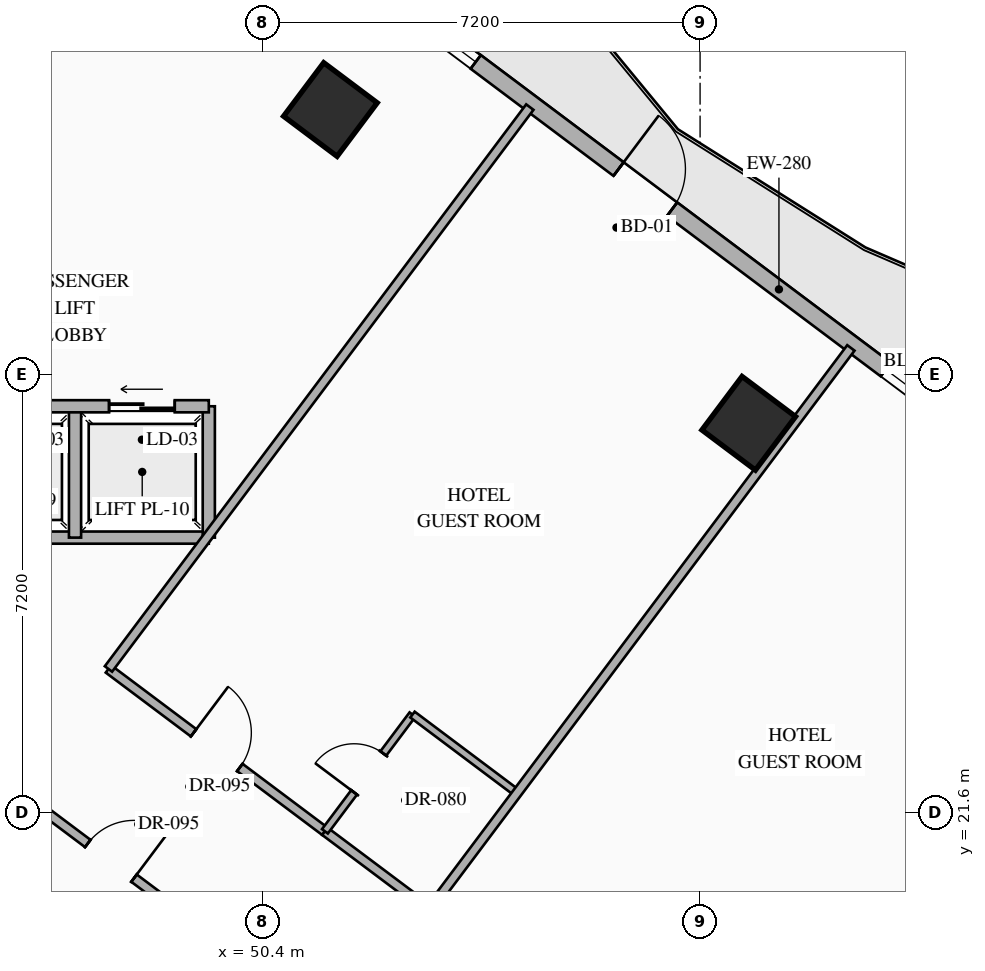
"""IFC4 building model, lengths in metres.
Left out: names, types, materials, properties, quantities, classifications, styles, units other than length and angle.
Written with IfcOpenShell. Run it as: python <this file> out.ifc"""

import sys

from ifc_helpers import new_model, si_unit, direction, frame, frame_2d, origin, origin_2d, place, context, subcontext, project, spatial, rectangle, hollow_rectangle, extrude, element, fill, save


model = new_model("IFC4")
c1 = context("Model", 3, precision=1e-05, world=origin(), true_north=direction((0.0, 1.0)))
c2 = subcontext(c1, "Body", "Model", "MODEL_VIEW")
j1 = project(units=[si_unit("LENGTHUNIT", "METRE"), si_unit("PLANEANGLEUNIT", "RADIAN")], contexts=[c1])
p1 = place(None, origin())
s1 = spatial("IfcSite", under=j1, at=p1, CompositionType="ELEMENT")
p2 = place(p1, origin())
s2 = spatial("IfcBuilding", under=s1, at=p2, CompositionType="ELEMENT")
p3 = place(p2, frame((0.0, 0.0, 39.95)))
s3 = spatial("IfcBuildingStorey", under=s2, at=p3, CompositionType="ELEMENT", Elevation=39.95)
for number, where, z_axis, x_axis in (
    (1, (51.52, 33.16, 0.0), (0.0, 0.0, 1.0), (0.8, -0.6, 0.0)),
    (2, (58.4, 28.0, 0.0), (0.0, 0.0, 1.0), (0.8, -0.6, 0.0)),
):
    element("IfcColumn", number, at=place(p3, frame(where, z_axis=z_axis, x_axis=x_axis)), inside=s3, PredefinedType="COLUMN", context=c2, shape_type="SweptSolid", body=[
        extrude(hollow_rectangle(XDim=1.1, YDim=1.1, WallThickness=0.04, at=origin_2d()), origin(), (0.0, 0.0, 1.0), 3.35),
    ])
p4 = place(p3, frame((44.86, 40.73, 0.0), z_axis=(0.0, 0.0, 1.0), x_axis=(0.800006902154, -0.599990797017, 0.0)))
e3 = element("IfcWall", 3, at=p4, inside=s3, PredefinedType="STANDARD", context=c2, shape_type="SweptSolid", body=[
    extrude(rectangle(XDim=29.712, YDim=0.28, at=frame_2d((14.856, 0.0))), origin(), (0.0, 0.0, 1.0), 3.13),
])
p5 = place(p4, frame((14.249, 0.0, 0.0)))
e4 = element("IfcOpeningElement", 4, at=p5, cuts=e3, PredefinedType="OPENING", context=c2, shape_type="SweptSolid", body=[
    extrude(rectangle(XDim=1.1, YDim=2.2, at=frame_2d((0.55, 1.1))), frame((0.0, 0.15, 0.0), z_axis=(0.0, -1.0, 0.0), x_axis=(1.0, 0.0, 0.0)), (0.0, 0.0, 1.0), 0.3),
])
p6 = place(p4, frame((1.612, 0.0, 0.85)))
e5 = element("IfcOpeningElement", 5, at=p6, cuts=e3, PredefinedType="OPENING", context=c2, shape_type="SweptSolid", body=[
    extrude(rectangle(XDim=1.4, YDim=1.8, at=frame_2d((0.7, 0.9))), frame((0.0, 0.15, 0.0), z_axis=(0.0, -1.0, 0.0), x_axis=(1.0, 0.0, 0.0)), (0.0, 0.0, 1.0), 0.3),
])
p7 = place(p4, frame((5.667, 0.0, 0.85)))
e6 = element("IfcOpeningElement", 6, at=p7, cuts=e3, PredefinedType="OPENING", context=c2, shape_type="SweptSolid", body=[
    extrude(rectangle(XDim=1.4, YDim=1.8, at=frame_2d((0.7, 0.9))), frame((0.0, 0.15, 0.0), z_axis=(0.0, -1.0, 0.0), x_axis=(1.0, 0.0, 0.0)), (0.0, 0.0, 1.0), 0.3),
])
p8 = place(p4, frame((9.912, 0.0, 0.85)))
e7 = element("IfcOpeningElement", 7, at=p8, cuts=e3, PredefinedType="OPENING", context=c2, shape_type="SweptSolid", body=[
    extrude(rectangle(XDim=1.4, YDim=1.8, at=frame_2d((0.7, 0.9))), frame((0.0, 0.15, 0.0), z_axis=(0.0, -1.0, 0.0), x_axis=(1.0, 0.0, 0.0)), (0.0, 0.0, 1.0), 0.3),
])
p9 = place(p4, frame((19.743, 0.0, 0.85)))
e8 = element("IfcOpeningElement", 8, at=p9, cuts=e3, PredefinedType="OPENING", context=c2, shape_type="SweptSolid", body=[
    extrude(rectangle(XDim=1.4, YDim=1.8, at=frame_2d((0.7, 0.9))), frame((0.0, 0.15, 0.0), z_axis=(0.0, -1.0, 0.0), x_axis=(1.0, 0.0, 0.0)), (0.0, 0.0, 1.0), 0.3),
])
p10 = place(p4, frame((22.645, 0.0, 0.85)))
e9 = element("IfcOpeningElement", 9, at=p10, cuts=e3, PredefinedType="OPENING", context=c2, shape_type="SweptSolid", body=[
    extrude(rectangle(XDim=1.4, YDim=1.8, at=frame_2d((0.7, 0.9))), frame((0.0, 0.15, 0.0), z_axis=(0.0, -1.0, 0.0), x_axis=(1.0, 0.0, 0.0)), (0.0, 0.0, 1.0), 0.3),
])
p11 = place(p4, frame((26.7, 0.0, 0.85)))
e10 = element("IfcOpeningElement", 10, at=p11, cuts=e3, PredefinedType="OPENING", context=c2, shape_type="SweptSolid", body=[
    extrude(rectangle(XDim=1.4, YDim=1.8, at=frame_2d((0.7, 0.9))), frame((0.0, 0.15, 0.0), z_axis=(0.0, -1.0, 0.0), x_axis=(1.0, 0.0, 0.0)), (0.0, 0.0, 1.0), 0.3),
])
p12 = place(p3, frame((53.318, 2.487, 0.0), z_axis=(0.0, 0.0, 1.0), x_axis=(-0.800004174678, 0.599994433723, 0.0)))
e11 = element("IfcWall", 11, at=p12, inside=s3, PredefinedType="STANDARD", context=c2, shape_type="SweptSolid", body=[
    extrude(rectangle(XDim=35.089, YDim=0.28, at=frame_2d((17.544, 0.0))), origin(), (0.0, 0.0, 1.0), 3.13),
])
p13 = place(p12, frame((1.931, 0.0, 0.85)))
e12 = element("IfcOpeningElement", 12, at=p13, cuts=e11, PredefinedType="OPENING", context=c2, shape_type="SweptSolid", body=[
    extrude(rectangle(XDim=1.4, YDim=1.8, at=frame_2d((0.7, 0.9))), frame((0.0, 0.15, 0.0), z_axis=(0.0, -1.0, 0.0), x_axis=(1.0, 0.0, 0.0)), (0.0, 0.0, 1.0), 0.3),
])
p14 = place(p12, frame((6.819, 0.0, 0.85)))
e13 = element("IfcOpeningElement", 13, at=p14, cuts=e11, PredefinedType="OPENING", context=c2, shape_type="SweptSolid", body=[
    extrude(rectangle(XDim=1.4, YDim=1.8, at=frame_2d((0.7, 0.9))), frame((0.0, 0.15, 0.0), z_axis=(0.0, -1.0, 0.0), x_axis=(1.0, 0.0, 0.0)), (0.0, 0.0, 1.0), 0.3),
])
p15 = place(p12, frame((11.832, 0.0, 0.85)))
e14 = element("IfcOpeningElement", 14, at=p15, cuts=e11, PredefinedType="OPENING", context=c2, shape_type="SweptSolid", body=[
    extrude(rectangle(XDim=1.4, YDim=1.8, at=frame_2d((0.7, 0.9))), frame((0.0, 0.15, 0.0), z_axis=(0.0, -1.0, 0.0), x_axis=(1.0, 0.0, 0.0)), (0.0, 0.0, 1.0), 0.3),
])
p16 = place(p12, frame((17.647, 0.0, 0.85)))
e15 = element("IfcOpeningElement", 15, at=p16, cuts=e11, PredefinedType="OPENING", context=c2, shape_type="SweptSolid", body=[
    extrude(rectangle(XDim=1.4, YDim=1.8, at=frame_2d((0.7, 0.9))), frame((0.0, 0.15, 0.0), z_axis=(0.0, -1.0, 0.0), x_axis=(1.0, 0.0, 0.0)), (0.0, 0.0, 1.0), 0.3),
])
p17 = place(p12, frame((21.857, 0.0, 0.85)))
e16 = element("IfcOpeningElement", 16, at=p17, cuts=e11, PredefinedType="OPENING", context=c2, shape_type="SweptSolid", body=[
    extrude(rectangle(XDim=1.4, YDim=1.8, at=frame_2d((0.7, 0.9))), frame((0.0, 0.15, 0.0), z_axis=(0.0, -1.0, 0.0), x_axis=(1.0, 0.0, 0.0)), (0.0, 0.0, 1.0), 0.3),
])
p18 = place(p12, frame((26.87, 0.0, 0.85)))
e17 = element("IfcOpeningElement", 17, at=p18, cuts=e11, PredefinedType="OPENING", context=c2, shape_type="SweptSolid", body=[
    extrude(rectangle(XDim=1.4, YDim=1.8, at=frame_2d((0.7, 0.9))), frame((0.0, 0.15, 0.0), z_axis=(0.0, -1.0, 0.0), x_axis=(1.0, 0.0, 0.0)), (0.0, 0.0, 1.0), 0.3),
])
p19 = place(p12, frame((31.757, 0.0, 0.85)))
e18 = element("IfcOpeningElement", 18, at=p19, cuts=e11, PredefinedType="OPENING", context=c2, shape_type="SweptSolid", body=[
    extrude(rectangle(XDim=1.4, YDim=1.8, at=frame_2d((0.7, 0.9))), frame((0.0, 0.15, 0.0), z_axis=(0.0, -1.0, 0.0), x_axis=(1.0, 0.0, 0.0)), (0.0, 0.0, 1.0), 0.3),
])
p20 = place(p3, frame((45.12, 26.12, 0.0), z_axis=(0.0, 0.0, 1.0), x_axis=(1.0, 0.0, 0.0)))
e19 = element("IfcWall", 19, at=p20, inside=s3, PredefinedType="STANDARD", context=c2, shape_type="SweptSolid", body=[
    extrude(rectangle(XDim=4.4, YDim=0.2, at=frame_2d((2.2, 0.0))), origin(), (0.0, 0.0, 1.0), 3.13),
])
for number, where, z_axis, x_axis in (
    (20, (49.52, 26.12, 0.0), (0.0, 0.0, 1.0), (0.0, 1.0, 0.0)),
    (21, (47.32, 26.12, 0.0), (0.0, 0.0, 1.0), (0.0, 1.0, 0.0)),
):
    element("IfcWall", number, at=place(p3, frame(where, z_axis=z_axis, x_axis=x_axis)), inside=s3, PredefinedType="STANDARD", context=c2, shape_type="SweptSolid", body=[
        extrude(rectangle(XDim=2.16, YDim=0.2, at=frame_2d((1.08, 0.0))), origin(), (0.0, 0.0, 1.0), 3.13),
    ])
p21 = place(p3, frame((45.12, 28.28, 0.0), z_axis=(0.0, 0.0, 1.0), x_axis=(1.0, 0.0, 0.0)))
e22 = element("IfcWall", 22, at=p21, inside=s3, PredefinedType="STANDARD", context=c2, shape_type="SweptSolid", body=[
    extrude(rectangle(XDim=4.4, YDim=0.2, at=frame_2d((2.2, 0.0))), origin(), (0.0, 0.0, 1.0), 3.13),
])
p22 = place(p21, frame((0.56, 0.0, 0.0)))
e23 = element("IfcOpeningElement", 23, at=p22, cuts=e22, PredefinedType="OPENING", context=c2, shape_type="SweptSolid", body=[
    extrude(rectangle(XDim=1.08, YDim=2.15, at=frame_2d((0.54, 1.075))), frame((0.0, 0.11, 0.0), z_axis=(0.0, -1.0, 0.0), x_axis=(1.0, 0.0, 0.0)), (0.0, 0.0, 1.0), 0.22),
])
p23 = place(p21, frame((2.76, 0.0, 0.0)))
e24 = element("IfcOpeningElement", 24, at=p23, cuts=e22, PredefinedType="OPENING", context=c2, shape_type="SweptSolid", body=[
    extrude(rectangle(XDim=1.08, YDim=2.15, at=frame_2d((0.54, 1.075))), frame((0.0, 0.11, 0.0), z_axis=(0.0, -1.0, 0.0), x_axis=(1.0, 0.0, 0.0)), (0.0, 0.0, 1.0), 0.22),
])
p24 = place(p3, frame((47.87, 23.96, 0.0), z_axis=(0.0, 0.0, 1.0), x_axis=(0.799993416095, -0.600008778439, 0.0)))
e25 = element("IfcWall", 25, at=p24, inside=s3, PredefinedType="PARTITIONING", context=c2, shape_type="SweptSolid", body=[
    extrude(rectangle(XDim=4.45, YDim=0.15, at=frame_2d((2.225, 0.0))), origin(), (0.0, 0.0, 1.0), 2.775),
])
p25 = place(p24, frame((1.75, 0.0, 0.0)))
e26 = element("IfcOpeningElement", 26, at=p25, cuts=e25, PredefinedType="OPENING", context=c2, shape_type="SweptSolid", body=[
    extrude(rectangle(XDim=0.95, YDim=2.15, at=frame_2d((0.475, 1.075))), frame((0.0, 0.085, 0.0), z_axis=(0.0, -1.0, 0.0), x_axis=(1.0, 0.0, 0.0)), (0.0, 0.0, 1.0), 0.17),
])
p26 = place(p3, frame((51.43, 21.29, 0.0), z_axis=(0.0, 0.0, 1.0), x_axis=(0.79998637334, -0.60001816845, 0.0)))
e27 = element("IfcWall", 27, at=p26, inside=s3, PredefinedType="PARTITIONING", context=c2, shape_type="SweptSolid", body=[
    extrude(rectangle(XDim=2.15, YDim=0.15, at=frame_2d((1.075, 0.0))), origin(), (0.0, 0.0, 1.0), 2.775),
])
p27 = place(p3, frame((51.43, 21.29, 0.0), z_axis=(0.0, 0.0, 1.0), x_axis=(0.600065100855, 0.79995117022, 0.0)))
e28 = element("IfcWall", 28, at=p27, inside=s3, PredefinedType="PARTITIONING", context=c2, shape_type="SweptSolid", body=[
    extrude(rectangle(XDim=2.4, YDim=0.12, at=frame_2d((1.2, 0.0))), origin(), (0.0, 0.0, 1.0), 3.13),
])
p28 = place(p27, frame((0.8, 0.0, 0.0)))
e29 = element("IfcOpeningElement", 29, at=p28, cuts=e28, PredefinedType="OPENING", context=c2, shape_type="SweptSolid", body=[
    extrude(rectangle(XDim=0.8, YDim=2.06, at=frame_2d((0.4, 1.03))), frame((0.0, 0.07, 0.0), z_axis=(0.0, -1.0, 0.0), x_axis=(1.0, 0.0, 0.0)), (0.0, 0.0, 1.0), 0.14),
])
p29 = place(p3, frame((52.87, 23.21, 0.0), z_axis=(0.0, 0.0, 1.0), x_axis=(0.79998637334, -0.60001816845, 0.0)))
e30 = element("IfcWall", 30, at=p29, inside=s3, PredefinedType="PARTITIONING", context=c2, shape_type="SweptSolid", body=[
    extrude(rectangle(XDim=2.15, YDim=0.12, at=frame_2d((1.075, 0.0))), origin(), (0.0, 0.0, 1.0), 3.13),
])
for number, where, z_axis, x_axis in (
    (31, (47.87, 23.96, 0.0), (0.0, 0.0, 1.0), (0.6, 0.8, 0.0)),
    (32, (53.15, 20.0, 0.0), (0.0, 0.0, 1.0), (0.6, 0.8, 0.0)),
    (33, (58.43, 16.04, 0.0), (0.0, 0.0, 1.0), (0.6, 0.8, 0.0)),
):
    element("IfcWall", number, at=place(p3, frame(where, z_axis=z_axis, x_axis=x_axis)), inside=s3, PredefinedType="PARTITIONING", context=c2, shape_type="SweptSolid", body=[
        extrude(rectangle(XDim=11.55, YDim=0.15, at=frame_2d((5.775, 0.0))), origin(), (0.0, 0.0, 1.0), 3.13),
    ])
p30 = place(p3, frame((46.37, 21.96, 0.0), z_axis=(0.0, 0.0, 1.0), x_axis=(0.799977170108, -0.600030438649, 0.0)))
e34 = element("IfcWall", 34, at=p30, inside=s3, PredefinedType="PARTITIONING", context=c2, shape_type="SweptSolid", body=[
    extrude(rectangle(XDim=3.85, YDim=0.15, at=frame_2d((1.925, 0.0))), origin(), (0.0, 0.0, 1.0), 2.425),
])
p31 = place(p30, frame((1.45, 0.0, 0.0)))
e35 = element("IfcOpeningElement", 35, at=p31, cuts=e34, PredefinedType="OPENING", context=c2, shape_type="SweptSolid", body=[
    extrude(rectangle(XDim=0.95, YDim=2.15, at=frame_2d((0.475, 1.075))), frame((0.0, 0.085, 0.0), z_axis=(0.0, -1.0, 0.0), x_axis=(1.0, 0.0, 0.0)), (0.0, 0.0, 1.0), 0.17),
])
p32 = place(p5, origin())
e36 = element("IfcDoor", 36, at=p32, inside=s3, OperationType="SINGLE_SWING_LEFT", PredefinedType="DOOR", context=c2, shape_type="SweptSolid", body=[
    extrude(rectangle(XDim=1.1, YDim=2.2, at=frame_2d((0.55, 1.1))), frame((0.0, 0.025, 0.0), z_axis=(0.0, -1.0, 0.0), x_axis=(1.0, 0.0, 0.0)), (0.0, 0.0, 1.0), 0.05),
])
fill(e4, e36)
p33 = place(p8, origin())
e37 = element("IfcWindow", 37, at=p33, inside=s3, PartitioningType="SINGLE_PANEL", PredefinedType="WINDOW", context=c2, shape_type="SweptSolid", body=[
    extrude(rectangle(XDim=1.4, YDim=1.8, at=frame_2d((0.7, 0.9))), frame((0.0, 0.03, 0.0), z_axis=(0.0, -1.0, 0.0), x_axis=(1.0, 0.0, 0.0)), (0.0, 0.0, 1.0), 0.06),
])
fill(e7, e37)
p34 = place(p9, origin())
e38 = element("IfcWindow", 38, at=p34, inside=s3, PartitioningType="SINGLE_PANEL", PredefinedType="WINDOW", context=c2, shape_type="SweptSolid", body=[
    extrude(rectangle(XDim=1.4, YDim=1.8, at=frame_2d((0.7, 0.9))), frame((0.0, 0.03, 0.0), z_axis=(0.0, -1.0, 0.0), x_axis=(1.0, 0.0, 0.0)), (0.0, 0.0, 1.0), 0.06),
])
fill(e8, e38)
p35 = place(p23, origin())
e39 = element("IfcDoor", 39, at=p35, inside=s3, OperationType="SLIDING_TO_LEFT", PredefinedType="USERDEFINED", context=c2, shape_type="SweptSolid", body=[
    extrude(rectangle(XDim=1.08, YDim=2.15, at=frame_2d((0.54, 1.075))), frame((0.0, 0.025, 0.0), z_axis=(0.0, -1.0, 0.0), x_axis=(1.0, 0.0, 0.0)), (0.0, 0.0, 1.0), 0.05),
])
fill(e24, e39)
p36 = place(p25, origin())
e40 = element("IfcDoor", 40, at=p36, inside=s3, OperationType="SINGLE_SWING_LEFT", PredefinedType="DOOR", context=c2, shape_type="SweptSolid", body=[
    extrude(rectangle(XDim=0.95, YDim=2.15, at=frame_2d((0.475, 1.075))), frame((0.0, 0.025, 0.0), z_axis=(0.0, -1.0, 0.0), x_axis=(1.0, 0.0, 0.0)), (0.0, 0.0, 1.0), 0.05),
])
fill(e26, e40)
p37 = place(p28, origin())
e41 = element("IfcDoor", 41, at=p37, inside=s3, OperationType="SINGLE_SWING_LEFT", PredefinedType="DOOR", context=c2, shape_type="SweptSolid", body=[
    extrude(rectangle(XDim=0.8, YDim=2.06, at=frame_2d((0.4, 1.03))), frame((0.0, 0.025, 0.0), z_axis=(0.0, -1.0, 0.0), x_axis=(1.0, 0.0, 0.0)), (0.0, 0.0, 1.0), 0.05),
])
fill(e29, e41)
p38 = place(p31, origin())
e42 = element("IfcDoor", 42, at=p38, inside=s3, OperationType="SINGLE_SWING_RIGHT", PredefinedType="DOOR", context=c2, shape_type="SweptSolid", body=[
    extrude(rectangle(XDim=0.95, YDim=2.15, at=frame_2d((0.475, 1.075))), frame((0.0, 0.025, 0.0), z_axis=(0.0, -1.0, 0.0), x_axis=(1.0, 0.0, 0.0)), (0.0, 0.0, 1.0), 0.05),
])
fill(e35, e42)
save(model, sys.argv[1])
